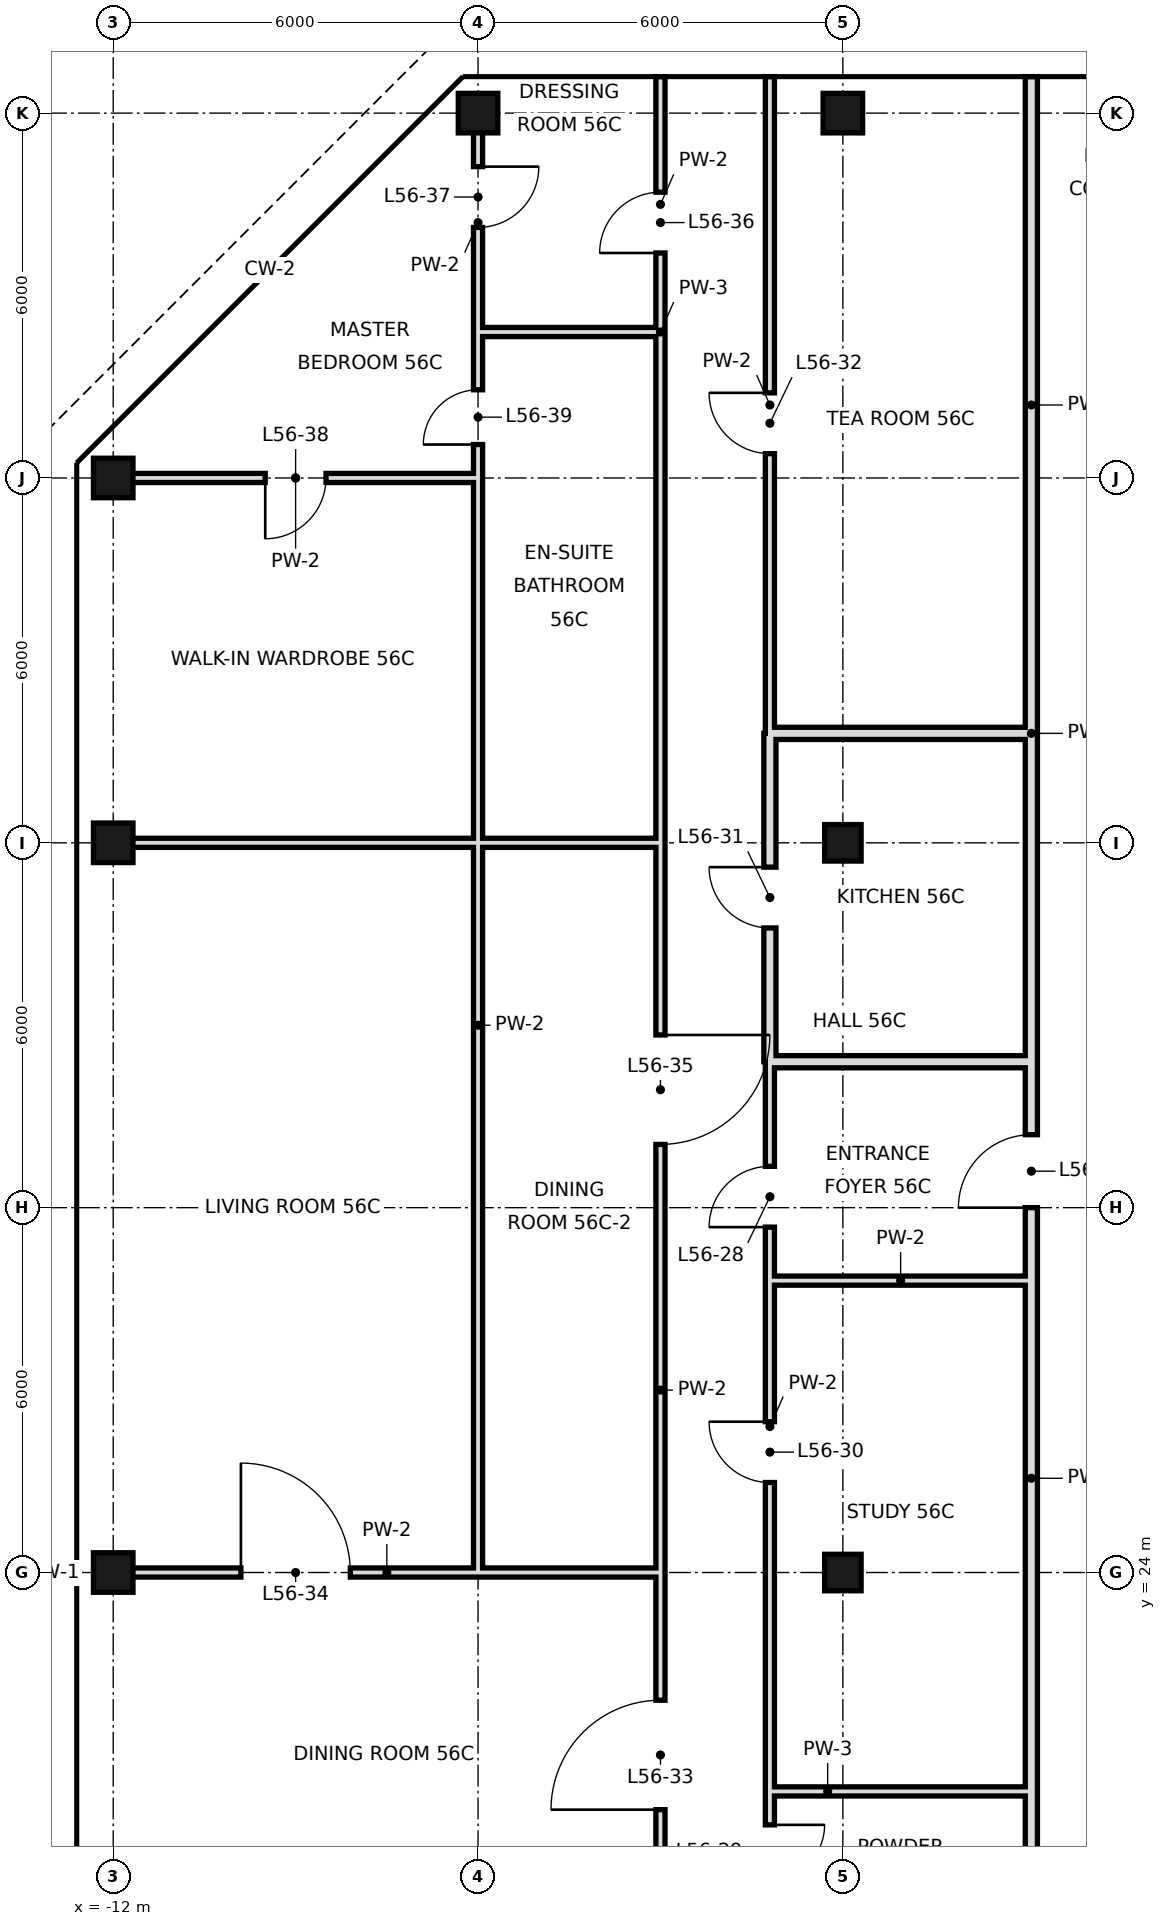
"""IFC4 building model, lengths in metres.
Left out: names, types, materials, properties, quantities, classifications, styles, units other than length and angle.
Written with IfcOpenShell. Run it as: python <this file> out.ifc"""

import sys

from ifc_helpers import new_model, si_unit, direction, frame, frame_2d, origin, origin_2d, place, context, subcontext, project, spatial, rectangle, hollow_rectangle, extrude, element, fill, save


model = new_model("IFC4")
c1 = context("Model", 3, precision=1e-05, world=origin(), true_north=direction((0.0, 1.0)))
c2 = subcontext(c1, "Body", "Model", "MODEL_VIEW")
j1 = project(units=[si_unit("LENGTHUNIT", "METRE"), si_unit("PLANEANGLEUNIT", "RADIAN")], contexts=[c1])
p1 = place(None, origin())
s1 = spatial("IfcSite", under=j1, at=p1, CompositionType="ELEMENT")
p2 = place(p1, origin())
s2 = spatial("IfcBuilding", under=s1, at=p2, CompositionType="ELEMENT")
p3 = place(p2, frame((0.0, 0.0, 239.6)))
s3 = spatial("IfcBuildingStorey", under=s2, at=p3, CompositionType="ELEMENT", Elevation=239.6)
for number, where, z_axis, x_axis in (
    (1, (-12.0, 24.0, 0.0), (0.0, 0.0, 1.0), (1.0, 0.0, 0.0)),
    (2, (-12.0, 36.0, 0.0), (0.0, 0.0, 1.0), (1.0, 0.0, 0.0)),
    (3, (-12.0, 42.0, 0.0), (0.0, 0.0, 1.0), (1.0, 0.0, 0.0)),
    (4, (-6.0, 48.0, 0.0), (0.0, 0.0, 1.0), (1.0, 0.0, 0.0)),
):
    element("IfcColumn", number, at=place(p3, frame(where, z_axis=z_axis, x_axis=x_axis)), inside=s3, PredefinedType="COLUMN", context=c2, shape_type="SweptSolid", body=[
        extrude(hollow_rectangle(XDim=0.65, YDim=0.65, WallThickness=0.032, at=origin_2d()), origin(), (0.0, 0.0, 1.0), 3.6),
    ])
for number, where, z_axis, x_axis in (
    (5, (0.0, 24.0, 0.0), (0.0, 0.0, 1.0), (1.0, 0.0, 0.0)),
    (6, (0.0, 36.0, 0.0), (0.0, 0.0, 1.0), (1.0, 0.0, 0.0)),
):
    element("IfcColumn", number, at=place(p3, frame(where, z_axis=z_axis, x_axis=x_axis)), inside=s3, PredefinedType="COLUMN", context=c2, shape_type="SweptSolid", body=[
        extrude(hollow_rectangle(XDim=0.6, YDim=0.6, WallThickness=0.028, at=origin_2d()), origin(), (0.0, 0.0, 1.0), 3.6),
    ])
p4 = place(p3, frame((0.0, 48.0, 0.0), z_axis=(0.0, 0.0, 1.0), x_axis=(1.0, 0.0, 0.0)))
e7 = element("IfcColumn", 7, at=p4, inside=s3, PredefinedType="COLUMN", context=c2, shape_type="SweptSolid", body=[
    extrude(hollow_rectangle(XDim=0.65, YDim=0.65, WallThickness=0.032, at=origin_2d()), origin(), (0.0, 0.0, 1.0), 3.6),
])
p5 = place(p3, frame((-1.2, 32.4, 0.0), z_axis=(0.0, 0.0, 1.0), x_axis=(0.0, 1.0, 0.0)))
e8 = element("IfcWall", 8, at=p5, inside=s3, PredefinedType="SOLIDWALL", context=c2, shape_type="SweptSolid", body=[
    extrude(rectangle(XDim=5.4, YDim=0.2, at=frame_2d((2.7, 0.0))), origin(), (0.0, 0.0, 1.0), 2.72),
])
p6 = place(p5, frame((2.2, 0.0, 0.0)))
e9 = element("IfcOpeningElement", 9, at=p6, cuts=e8, PredefinedType="OPENING", context=c2, shape_type="SweptSolid", body=[
    extrude(rectangle(XDim=1.0, YDim=2.4, at=frame_2d((0.5, 1.2))), frame((0.0, 0.11, 0.0), z_axis=(0.0, -1.0, 0.0), x_axis=(1.0, 0.0, 0.0)), (0.0, 0.0, 1.0), 0.22),
])
p7 = place(p3, frame((-1.2, 20.4, 0.0), z_axis=(0.0, 0.0, 1.0), x_axis=(0.0, 1.0, 0.0)))
e10 = element("IfcWall", 10, at=p7, inside=s3, PredefinedType="PARTITIONING", context=c2, shape_type="SweptSolid", body=[
    extrude(rectangle(XDim=12.0, YDim=0.15, at=frame_2d((6.0, 0.0))), origin(), (0.0, 0.0, 1.0), 3.42),
])
p8 = place(p7, frame((9.28, 0.0, 0.0)))
e11 = element("IfcOpeningElement", 11, at=p8, cuts=e10, PredefinedType="OPENING", context=c2, shape_type="SweptSolid", body=[
    extrude(rectangle(XDim=1.0, YDim=2.4, at=frame_2d((0.5, 1.2))), frame((0.0, 0.085, 0.0), z_axis=(0.0, -1.0, 0.0), x_axis=(1.0, 0.0, 0.0)), (0.0, 0.0, 1.0), 0.17),
])
p9 = place(p7, frame((5.08, 0.0, 0.0)))
e12 = element("IfcOpeningElement", 12, at=p9, cuts=e10, PredefinedType="OPENING", context=c2, shape_type="SweptSolid", body=[
    extrude(rectangle(XDim=1.0, YDim=2.4, at=frame_2d((0.5, 1.2))), frame((0.0, 0.085, 0.0), z_axis=(0.0, -1.0, 0.0), x_axis=(1.0, 0.0, 0.0)), (0.0, 0.0, 1.0), 0.17),
])
p10 = place(p3, frame((-1.2, 37.8, 0.0), z_axis=(0.0, 0.0, 1.0), x_axis=(0.0, 1.0, 0.0)))
e13 = element("IfcWall", 13, at=p10, inside=s3, PredefinedType="PARTITIONING", context=c2, shape_type="SweptSolid", body=[
    extrude(rectangle(XDim=10.8, YDim=0.15, at=frame_2d((5.4, 0.0))), origin(), (0.0, 0.0, 1.0), 3.42),
])
p11 = place(p10, frame((4.6, 0.0, 0.0)))
e14 = element("IfcOpeningElement", 14, at=p11, cuts=e13, PredefinedType="OPENING", context=c2, shape_type="SweptSolid", body=[
    extrude(rectangle(XDim=1.0, YDim=2.4, at=frame_2d((0.5, 1.2))), frame((0.0, 0.085, 0.0), z_axis=(0.0, -1.0, 0.0), x_axis=(1.0, 0.0, 0.0)), (0.0, 0.0, 1.0), 0.17),
])
p12 = place(p3, frame((-1.2, 18.0, 0.0), z_axis=(0.0, 0.0, 1.0), x_axis=(0.0, 1.0, 0.0)))
e15 = element("IfcWall", 15, at=p12, inside=s3, PredefinedType="PARTITIONING", context=c2, shape_type="SweptSolid", body=[
    extrude(rectangle(XDim=2.4, YDim=0.15, at=frame_2d((1.2, 0.0))), origin(), (0.0, 0.0, 1.0), 3.42),
])
p13 = place(p12, frame((0.95, 0.0, 0.0)))
e16 = element("IfcOpeningElement", 16, at=p13, cuts=e15, PredefinedType="OPENING", context=c2, shape_type="SweptSolid", body=[
    extrude(rectangle(XDim=0.9, YDim=2.4, at=frame_2d((0.45, 1.2))), frame((0.0, 0.085, 0.0), z_axis=(0.0, -1.0, 0.0), x_axis=(1.0, 0.0, 0.0)), (0.0, 0.0, 1.0), 0.17),
])
p14 = place(p3, frame((-3.0, 18.0, 0.0), z_axis=(0.0, 0.0, 1.0), x_axis=(0.0, 1.0, 0.0)))
e17 = element("IfcWall", 17, at=p14, inside=s3, PredefinedType="PARTITIONING", context=c2, shape_type="SweptSolid", body=[
    extrude(rectangle(XDim=18.0, YDim=0.15, at=frame_2d((9.0, 0.0))), origin(), (0.0, 0.0, 1.0), 3.42),
])
p15 = place(p14, frame((2.1, 0.0, 0.0)))
e18 = element("IfcOpeningElement", 18, at=p15, cuts=e17, PredefinedType="OPENING", context=c2, shape_type="SweptSolid", body=[
    extrude(rectangle(XDim=1.8, YDim=2.4, at=frame_2d((0.9, 1.2))), frame((0.0, 0.085, 0.0), z_axis=(0.0, -1.0, 0.0), x_axis=(1.0, 0.0, 0.0)), (0.0, 0.0, 1.0), 0.17),
])
p16 = place(p14, frame((13.04, 0.0, 0.0)))
e19 = element("IfcOpeningElement", 19, at=p16, cuts=e17, PredefinedType="OPENING", context=c2, shape_type="SweptSolid", body=[
    extrude(rectangle(XDim=1.8, YDim=2.4, at=frame_2d((0.9, 1.2))), frame((0.0, 0.085, 0.0), z_axis=(0.0, -1.0, 0.0), x_axis=(1.0, 0.0, 0.0)), (0.0, 0.0, 1.0), 0.17),
])
p17 = place(p3, frame((-3.0, 44.4, 0.0), z_axis=(0.0, 0.0, 1.0), x_axis=(0.0, 1.0, 0.0)))
e20 = element("IfcWall", 20, at=p17, inside=s3, PredefinedType="PARTITIONING", context=c2, shape_type="SweptSolid", body=[
    extrude(rectangle(XDim=4.2, YDim=0.15, at=frame_2d((2.1, 0.0))), origin(), (0.0, 0.0, 1.0), 3.42),
])
p18 = place(p17, frame((1.3, 0.0, 0.0)))
e21 = element("IfcOpeningElement", 21, at=p18, cuts=e20, PredefinedType="OPENING", context=c2, shape_type="SweptSolid", body=[
    extrude(rectangle(XDim=1.0, YDim=2.4, at=frame_2d((0.5, 1.2))), frame((0.0, 0.085, 0.0), z_axis=(0.0, -1.0, 0.0), x_axis=(1.0, 0.0, 0.0)), (0.0, 0.0, 1.0), 0.17),
])
p19 = place(p3, frame((-3.0, 36.0, 0.0), z_axis=(0.0, 0.0, 1.0), x_axis=(0.0, 1.0, 0.0)))
e22 = element("IfcWall", 22, at=p19, inside=s3, PredefinedType="PARTITIONING", context=c2, shape_type="SweptSolid", body=[
    extrude(rectangle(XDim=8.4, YDim=0.15, at=frame_2d((4.2, 0.0))), origin(), (0.0, 0.0, 1.0), 3.42),
])
p20 = place(p3, frame((-6.0, 24.0, 0.0), z_axis=(0.0, 0.0, 1.0), x_axis=(0.0, 1.0, 0.0)))
e23 = element("IfcWall", 23, at=p20, inside=s3, PredefinedType="PARTITIONING", context=c2, shape_type="SweptSolid", body=[
    extrude(rectangle(XDim=12.0, YDim=0.15, at=frame_2d((6.0, 0.0))), origin(), (0.0, 0.0, 1.0), 3.42),
])
p21 = place(p3, frame((-6.0, 44.4, 0.0), z_axis=(0.0, 0.0, 1.0), x_axis=(0.0, 1.0, 0.0)))
e24 = element("IfcWall", 24, at=p21, inside=s3, PredefinedType="PARTITIONING", context=c2, shape_type="SweptSolid", body=[
    extrude(rectangle(XDim=3.6, YDim=0.15, at=frame_2d((1.8, 0.0))), origin(), (0.0, 0.0, 1.0), 3.42),
])
p22 = place(p21, frame((1.72, 0.0, 0.0)))
e25 = element("IfcOpeningElement", 25, at=p22, cuts=e24, PredefinedType="OPENING", context=c2, shape_type="SweptSolid", body=[
    extrude(rectangle(XDim=1.0, YDim=2.4, at=frame_2d((0.5, 1.2))), frame((0.0, 0.085, 0.0), z_axis=(0.0, -1.0, 0.0), x_axis=(1.0, 0.0, 0.0)), (0.0, 0.0, 1.0), 0.17),
])
p23 = place(p3, frame((-6.0, 36.0, 0.0), z_axis=(0.0, 0.0, 1.0), x_axis=(0.0, 1.0, 0.0)))
e26 = element("IfcWall", 26, at=p23, inside=s3, PredefinedType="PARTITIONING", context=c2, shape_type="SweptSolid", body=[
    extrude(rectangle(XDim=8.4, YDim=0.15, at=frame_2d((4.2, 0.0))), origin(), (0.0, 0.0, 1.0), 3.42),
])
p24 = place(p23, frame((6.55, 0.0, 0.0)))
e27 = element("IfcOpeningElement", 27, at=p24, cuts=e26, PredefinedType="OPENING", context=c2, shape_type="SweptSolid", body=[
    extrude(rectangle(XDim=0.9, YDim=2.4, at=frame_2d((0.45, 1.2))), frame((0.0, 0.085, 0.0), z_axis=(0.0, -1.0, 0.0), x_axis=(1.0, 0.0, 0.0)), (0.0, 0.0, 1.0), 0.17),
])
p25 = place(p3, frame((3.1, 18.7, 0.0), z_axis=(0.0, 0.0, 1.0), x_axis=(0.0, 1.0, 0.0)))
e28 = element("IfcWall", 28, at=p25, inside=s3, PredefinedType="SOLIDWALL", context=c2, shape_type="SweptSolid", body=[
    extrude(rectangle(XDim=13.7, YDim=0.2, at=frame_2d((6.85, 0.0))), origin(), (0.0, 0.0, 1.0), 2.97),
])
p26 = place(p25, frame((11.3, 0.0, 0.0)))
e29 = element("IfcOpeningElement", 29, at=p26, cuts=e28, PredefinedType="OPENING", context=c2, shape_type="SweptSolid", body=[
    extrude(rectangle(XDim=1.2, YDim=2.4, at=frame_2d((0.6, 1.2))), frame((0.0, 0.11, 0.0), z_axis=(0.0, -1.0, 0.0), x_axis=(1.0, 0.0, 0.0)), (0.0, 0.0, 1.0), 0.22),
])
p27 = place(p3, frame((3.1, 37.8, 0.0), z_axis=(0.0, 0.0, 1.0), x_axis=(0.0, 1.0, 0.0)))
e30 = element("IfcWall", 30, at=p27, inside=s3, PredefinedType="SOLIDWALL", context=c2, shape_type="SweptSolid", body=[
    extrude(rectangle(XDim=10.8, YDim=0.2, at=frame_2d((5.4, 0.0))), origin(), (0.0, 0.0, 1.0), 2.72),
])
p28 = place(p3, frame((3.1, 32.4, 0.0), z_axis=(0.0, 0.0, 1.0), x_axis=(0.0, 1.0, 0.0)))
e31 = element("IfcWall", 31, at=p28, inside=s3, PredefinedType="SOLIDWALL", context=c2, shape_type="SweptSolid", body=[
    extrude(rectangle(XDim=5.4, YDim=0.2, at=frame_2d((2.7, 0.0))), origin(), (0.0, 0.0, 1.0), 3.42),
])
p29 = place(p3, frame((-1.2, 20.4, 0.0), z_axis=(0.0, 0.0, 1.0), x_axis=(1.0, 0.0, 0.0)))
e32 = element("IfcWall", 32, at=p29, inside=s3, PredefinedType="PARTITIONING", context=c2, shape_type="SweptSolid", body=[
    extrude(rectangle(XDim=4.3, YDim=0.15, at=frame_2d((2.15, 0.0))), origin(), (0.0, 0.0, 1.0), 3.42),
])
p30 = place(p3, frame((-12.0, 24.0, 0.0), z_axis=(0.0, 0.0, 1.0), x_axis=(1.0, 0.0, 0.0)))
e33 = element("IfcWall", 33, at=p30, inside=s3, PredefinedType="PARTITIONING", context=c2, shape_type="SweptSolid", body=[
    extrude(rectangle(XDim=9.0, YDim=0.15, at=frame_2d((4.5, 0.0))), origin(), (0.0, 0.0, 1.0), 2.72),
])
p31 = place(p30, frame((2.1, 0.0, 0.0)))
e34 = element("IfcOpeningElement", 34, at=p31, cuts=e33, PredefinedType="OPENING", context=c2, shape_type="SweptSolid", body=[
    extrude(rectangle(XDim=1.8, YDim=2.4, at=frame_2d((0.9, 1.2))), frame((0.0, 0.085, 0.0), z_axis=(0.0, -1.0, 0.0), x_axis=(1.0, 0.0, 0.0)), (0.0, 0.0, 1.0), 0.17),
])
p32 = place(p3, frame((-1.2, 28.8, 0.0), z_axis=(0.0, 0.0, 1.0), x_axis=(1.0, 0.0, 0.0)))
e35 = element("IfcWall", 35, at=p32, inside=s3, PredefinedType="PARTITIONING", context=c2, shape_type="SweptSolid", body=[
    extrude(rectangle(XDim=4.3, YDim=0.15, at=frame_2d((2.15, 0.0))), origin(), (0.0, 0.0, 1.0), 3.42),
])
p33 = place(p3, frame((-1.2, 32.4, 0.0), z_axis=(0.0, 0.0, 1.0), x_axis=(1.0, 0.0, 0.0)))
e36 = element("IfcWall", 36, at=p33, inside=s3, PredefinedType="SOLIDWALL", context=c2, shape_type="SweptSolid", body=[
    extrude(rectangle(XDim=4.3, YDim=0.2, at=frame_2d((2.15, 0.0))), origin(), (0.0, 0.0, 1.0), 2.72),
])
p34 = place(p3, frame((-12.0, 36.0, 0.0), z_axis=(0.0, 0.0, 1.0), x_axis=(1.0, 0.0, 0.0)))
e37 = element("IfcWall", 37, at=p34, inside=s3, PredefinedType="PARTITIONING", context=c2, shape_type="SweptSolid", body=[
    extrude(rectangle(XDim=6.0, YDim=0.15, at=frame_2d((3.0, 0.0))), origin(), (0.0, 0.0, 1.0), 2.72),
])
p35 = place(p3, frame((-6.0, 36.0, 0.0), z_axis=(0.0, 0.0, 1.0), x_axis=(1.0, 0.0, 0.0)))
e38 = element("IfcWall", 38, at=p35, inside=s3, PredefinedType="PARTITIONING", context=c2, shape_type="SweptSolid", body=[
    extrude(rectangle(XDim=3.0, YDim=0.15, at=frame_2d((1.5, 0.0))), origin(), (0.0, 0.0, 1.0), 2.72),
])
p36 = place(p3, frame((-1.2, 37.8, 0.0), z_axis=(0.0, 0.0, 1.0), x_axis=(1.0, 0.0, 0.0)))
e39 = element("IfcWall", 39, at=p36, inside=s3, PredefinedType="SOLIDWALL", context=c2, shape_type="SweptSolid", body=[
    extrude(rectangle(XDim=4.3, YDim=0.2, at=frame_2d((2.15, 0.0))), origin(), (0.0, 0.0, 1.0), 2.72),
])
p37 = place(p3, frame((-12.0, 42.0, 0.0), z_axis=(0.0, 0.0, 1.0), x_axis=(1.0, 0.0, 0.0)))
e40 = element("IfcWall", 40, at=p37, inside=s3, PredefinedType="PARTITIONING", context=c2, shape_type="SweptSolid", body=[
    extrude(rectangle(XDim=6.0, YDim=0.15, at=frame_2d((3.0, 0.0))), origin(), (0.0, 0.0, 1.0), 2.72),
])
p38 = place(p37, frame((2.5, 0.0, 0.0)))
e41 = element("IfcOpeningElement", 41, at=p38, cuts=e40, PredefinedType="OPENING", context=c2, shape_type="SweptSolid", body=[
    extrude(rectangle(XDim=1.0, YDim=2.4, at=frame_2d((0.5, 1.2))), frame((0.0, 0.085, 0.0), z_axis=(0.0, -1.0, 0.0), x_axis=(1.0, 0.0, 0.0)), (0.0, 0.0, 1.0), 0.17),
])
p39 = place(p3, frame((-6.0, 44.4, 0.0), z_axis=(0.0, 0.0, 1.0), x_axis=(1.0, 0.0, 0.0)))
e42 = element("IfcWall", 42, at=p39, inside=s3, PredefinedType="PARTITIONING", context=c2, shape_type="SweptSolid", body=[
    extrude(rectangle(XDim=3.0, YDim=0.15, at=frame_2d((1.5, 0.0))), origin(), (0.0, 0.0, 1.0), 3.42),
])
p40 = place(p8, origin())
e43 = element("IfcDoor", 43, at=p40, inside=s3, OperationType="SINGLE_SWING_LEFT", PredefinedType="DOOR", context=c2, shape_type="SweptSolid", body=[
    extrude(rectangle(XDim=1.0, YDim=2.4, at=frame_2d((0.5, 1.2))), frame((0.0, 0.025, 0.0), z_axis=(0.0, -1.0, 0.0), x_axis=(1.0, 0.0, 0.0)), (0.0, 0.0, 1.0), 0.05),
])
fill(e11, e43)
p41 = place(p13, origin())
e44 = element("IfcDoor", 44, at=p41, inside=s3, OperationType="SINGLE_SWING_RIGHT", PredefinedType="DOOR", context=c2, shape_type="SweptSolid", body=[
    extrude(rectangle(XDim=0.9, YDim=2.4, at=frame_2d((0.45, 1.2))), frame((0.0, 0.025, 0.0), z_axis=(0.0, -1.0, 0.0), x_axis=(1.0, 0.0, 0.0)), (0.0, 0.0, 1.0), 0.05),
])
fill(e16, e44)
p42 = place(p9, frame((1.0, 0.0, 0.0), z_axis=(0.0, 0.0, 1.0), x_axis=(-1.0, 0.0, 0.0)))
e45 = element("IfcDoor", 45, at=p42, inside=s3, OperationType="SINGLE_SWING_LEFT", PredefinedType="DOOR", context=c2, shape_type="SweptSolid", body=[
    extrude(rectangle(XDim=1.0, YDim=2.4, at=frame_2d((0.5, 1.2))), frame((0.0, 0.025, 0.0), z_axis=(0.0, -1.0, 0.0), x_axis=(1.0, 0.0, 0.0)), (0.0, 0.0, 1.0), 0.05),
])
fill(e12, e45)
p43 = place(p6, frame((1.0, 0.0, 0.0), z_axis=(0.0, 0.0, 1.0), x_axis=(-1.0, 0.0, 0.0)))
e46 = element("IfcDoor", 46, at=p43, inside=s3, OperationType="SINGLE_SWING_LEFT", PredefinedType="DOOR", context=c2, shape_type="SweptSolid", body=[
    extrude(rectangle(XDim=1.0, YDim=2.4, at=frame_2d((0.5, 1.2))), frame((0.0, 0.025, 0.0), z_axis=(0.0, -1.0, 0.0), x_axis=(1.0, 0.0, 0.0)), (0.0, 0.0, 1.0), 0.05),
])
fill(e9, e46)
p44 = place(p11, frame((1.0, 0.0, 0.0), z_axis=(0.0, 0.0, 1.0), x_axis=(-1.0, 0.0, 0.0)))
e47 = element("IfcDoor", 47, at=p44, inside=s3, OperationType="SINGLE_SWING_LEFT", PredefinedType="DOOR", context=c2, shape_type="SweptSolid", body=[
    extrude(rectangle(XDim=1.0, YDim=2.4, at=frame_2d((0.5, 1.2))), frame((0.0, 0.025, 0.0), z_axis=(0.0, -1.0, 0.0), x_axis=(1.0, 0.0, 0.0)), (0.0, 0.0, 1.0), 0.05),
])
fill(e14, e47)
p45 = place(p15, origin())
e48 = element("IfcDoor", 48, at=p45, inside=s3, OperationType="SINGLE_SWING_LEFT", PredefinedType="DOOR", context=c2, shape_type="SweptSolid", body=[
    extrude(rectangle(XDim=1.8, YDim=2.4, at=frame_2d((0.9, 1.2))), frame((0.0, 0.025, 0.0), z_axis=(0.0, -1.0, 0.0), x_axis=(1.0, 0.0, 0.0)), (0.0, 0.0, 1.0), 0.05),
])
fill(e18, e48)
p46 = place(p31, origin())
e49 = element("IfcDoor", 49, at=p46, inside=s3, OperationType="SINGLE_SWING_LEFT", PredefinedType="DOOR", context=c2, shape_type="SweptSolid", body=[
    extrude(rectangle(XDim=1.8, YDim=2.4, at=frame_2d((0.9, 1.2))), frame((0.0, 0.025, 0.0), z_axis=(0.0, -1.0, 0.0), x_axis=(1.0, 0.0, 0.0)), (0.0, 0.0, 1.0), 0.05),
])
fill(e34, e49)
p47 = place(p16, origin())
e50 = element("IfcDoor", 50, at=p47, inside=s3, OperationType="SINGLE_SWING_RIGHT", PredefinedType="DOOR", context=c2, shape_type="SweptSolid", body=[
    extrude(rectangle(XDim=1.8, YDim=2.4, at=frame_2d((0.9, 1.2))), frame((0.0, 0.025, 0.0), z_axis=(0.0, -1.0, 0.0), x_axis=(1.0, 0.0, 0.0)), (0.0, 0.0, 1.0), 0.05),
])
fill(e19, e50)
p48 = place(p18, origin())
e51 = element("IfcDoor", 51, at=p48, inside=s3, OperationType="SINGLE_SWING_LEFT", PredefinedType="DOOR", context=c2, shape_type="SweptSolid", body=[
    extrude(rectangle(XDim=1.0, YDim=2.4, at=frame_2d((0.5, 1.2))), frame((0.0, 0.025, 0.0), z_axis=(0.0, -1.0, 0.0), x_axis=(1.0, 0.0, 0.0)), (0.0, 0.0, 1.0), 0.05),
])
fill(e21, e51)
p49 = place(p22, origin())
e52 = element("IfcDoor", 52, at=p49, inside=s3, OperationType="SINGLE_SWING_RIGHT", PredefinedType="DOOR", context=c2, shape_type="SweptSolid", body=[
    extrude(rectangle(XDim=1.0, YDim=2.4, at=frame_2d((0.5, 1.2))), frame((0.0, 0.025, 0.0), z_axis=(0.0, -1.0, 0.0), x_axis=(1.0, 0.0, 0.0)), (0.0, 0.0, 1.0), 0.05),
])
fill(e25, e52)
p50 = place(p38, frame((1.0, 0.0, 0.0), z_axis=(0.0, 0.0, 1.0), x_axis=(-1.0, 0.0, 0.0)))
e53 = element("IfcDoor", 53, at=p50, inside=s3, OperationType="SINGLE_SWING_RIGHT", PredefinedType="DOOR", context=c2, shape_type="SweptSolid", body=[
    extrude(rectangle(XDim=1.0, YDim=2.4, at=frame_2d((0.5, 1.2))), frame((0.0, 0.025, 0.0), z_axis=(0.0, -1.0, 0.0), x_axis=(1.0, 0.0, 0.0)), (0.0, 0.0, 1.0), 0.05),
])
fill(e41, e53)
p51 = place(p24, origin())
e54 = element("IfcDoor", 54, at=p51, inside=s3, OperationType="SINGLE_SWING_LEFT", PredefinedType="DOOR", context=c2, shape_type="SweptSolid", body=[
    extrude(rectangle(XDim=0.9, YDim=2.4, at=frame_2d((0.45, 1.2))), frame((0.0, 0.025, 0.0), z_axis=(0.0, -1.0, 0.0), x_axis=(1.0, 0.0, 0.0)), (0.0, 0.0, 1.0), 0.05),
])
fill(e27, e54)
p52 = place(p26, origin())
e55 = element("IfcDoor", 55, at=p52, inside=s3, OperationType="SINGLE_SWING_LEFT", PredefinedType="DOOR", context=c2, shape_type="SweptSolid", body=[
    extrude(rectangle(XDim=1.2, YDim=2.4, at=frame_2d((0.6, 1.2))), frame((0.0, 0.025, 0.0), z_axis=(0.0, -1.0, 0.0), x_axis=(1.0, 0.0, 0.0)), (0.0, 0.0, 1.0), 0.05),
])
fill(e29, e55)
save(model, sys.argv[1])
